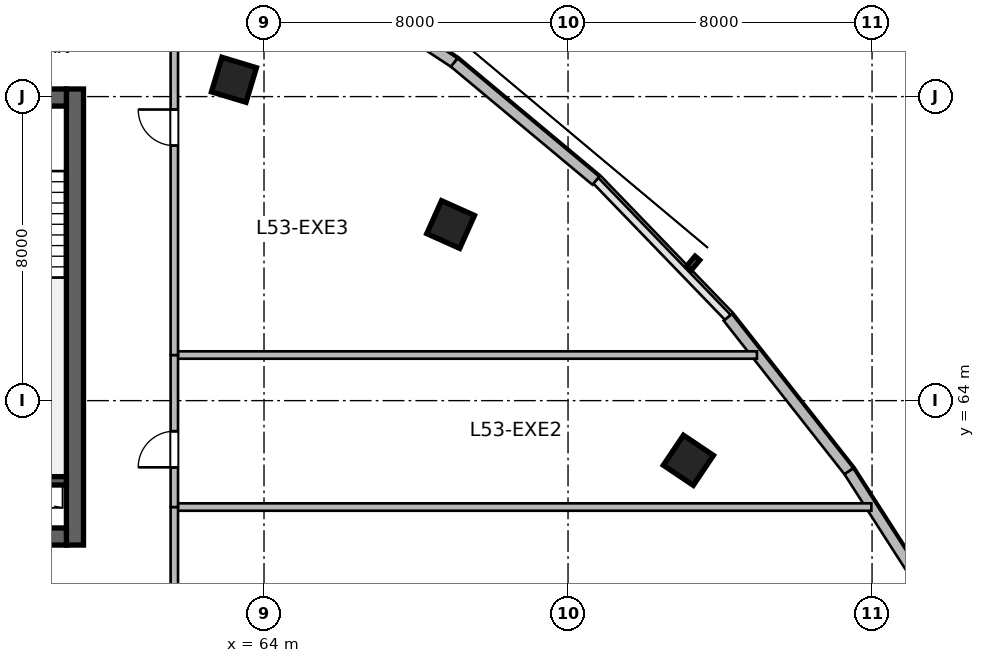
"""IFC4 building model, lengths in metres.
Left out: names, types, materials, properties, quantities, classifications, styles, units other than length and angle.
Written with IfcOpenShell. Run it as: python <this file> out.ifc"""

import sys

from ifc_helpers import new_model, si_unit, direction, frame, frame_2d, origin, origin_2d, place, context, subcontext, project, spatial, rectangle, extrude, source, transform, mapped, element, fill, save


model = new_model("IFC4")
c1 = context("Model", 3, precision=1e-05, world=origin(), true_north=direction((0.0, 1.0)))
c2 = subcontext(c1, "Body", "Model", "MODEL_VIEW")
j1 = project(units=[si_unit("LENGTHUNIT", "METRE"), si_unit("PLANEANGLEUNIT", "RADIAN")], contexts=[c1])
p1 = place(None, origin())
s1 = spatial("IfcSite", under=j1, at=p1, CompositionType="ELEMENT")
p2 = place(p1, origin())
s2 = spatial("IfcBuilding", under=s1, at=p2, CompositionType="ELEMENT")
p3 = place(p2, frame((0.0, 0.0, 219.6)))
s3 = spatial("IfcBuildingStorey", under=s2, at=p3, CompositionType="ELEMENT", Elevation=219.6)
m1 = source(origin(), c2, "Body", "SweptSolid", [
    extrude(rectangle(XDim=12.0, YDim=0.45, at=frame_2d((6.0, 0.0))), origin(), (0.0, 0.0, 1.0), 3.9),
])
p4 = place(p3, frame((59.025, 60.2, 0.0), z_axis=(0.0, 0.0, 1.0), x_axis=(0.0, 1.0, 0.0)))
e1 = element("IfcWall", 1, at=p4, inside=s3, PredefinedType="SHEAR", context=c2, shape_type="MappedRepresentation", body=[
    mapped(m1, transform((0.0, 0.0, 0.0), scale=1.0)),
])
m2 = source(origin(), c2, "Body", "SweptSolid", [
    extrude(rectangle(XDim=21.6, YDim=0.45, at=frame_2d((10.8, 0.0))), origin(), (0.0, 0.0, 1.0), 3.9),
])
p5 = place(p3, frame((37.2, 60.425, 0.0), z_axis=(0.0, 0.0, 1.0), x_axis=(1.0, 0.0, 0.0)))
e2 = element("IfcWall", 2, at=p5, inside=s3, PredefinedType="SHEAR", context=c2, shape_type="MappedRepresentation", body=[
    mapped(m2, transform((0.0, 0.0, 0.0), scale=1.0)),
])
p6 = place(p5, frame((1.1, 0.0, 0.0)))
e3 = element("IfcOpeningElement", 3, at=p6, cuts=e2, PredefinedType="OPENING", context=c2, shape_type="SweptSolid", body=[
    extrude(rectangle(XDim=1.15, YDim=2.15, at=frame_2d((0.575, 1.075))), frame((0.0, 0.235, 0.0), z_axis=(0.0, -1.0, 0.0), x_axis=(1.0, 0.0, 0.0)), (0.0, 0.0, 1.0), 0.47),
])
p7 = place(p5, frame((19.5, 0.0, 0.0)))
e4 = element("IfcOpeningElement", 4, at=p7, cuts=e2, PredefinedType="OPENING", context=c2, shape_type="SweptSolid", body=[
    extrude(rectangle(XDim=0.9, YDim=2.1, at=frame_2d((0.45, 1.05))), frame((0.0, 0.235, 0.0), z_axis=(0.0, -1.0, 0.0), x_axis=(1.0, 0.0, 0.0)), (0.0, 0.0, 1.0), 0.47),
])
p8 = place(p5, frame((12.02, 0.0, 0.0)))
e5 = element("IfcOpeningElement", 5, at=p8, cuts=e2, PredefinedType="OPENING", context=c2, shape_type="SweptSolid", body=[
    extrude(rectangle(XDim=1.6, YDim=2.15, at=frame_2d((0.8, 1.075))), frame((0.0, 0.235, 0.0), z_axis=(0.0, -1.0, 0.0), x_axis=(1.0, 0.0, 0.0)), (0.0, 0.0, 1.0), 0.47),
])
p9 = place(p3, frame((37.2, 71.975, 0.0), z_axis=(0.0, 0.0, 1.0), x_axis=(1.0, 0.0, 0.0)))
e6 = element("IfcWall", 6, at=p9, inside=s3, PredefinedType="SHEAR", context=c2, shape_type="MappedRepresentation", body=[
    mapped(m2, transform((0.0, 0.0, 0.0), scale=1.0)),
])
p10 = place(p9, frame((1.2, 0.0, 0.0)))
e7 = element("IfcOpeningElement", 7, at=p10, cuts=e6, PredefinedType="OPENING", context=c2, shape_type="SweptSolid", body=[
    extrude(rectangle(XDim=0.9, YDim=2.1, at=frame_2d((0.45, 1.05))), frame((0.0, 0.235, 0.0), z_axis=(0.0, -1.0, 0.0), x_axis=(1.0, 0.0, 0.0)), (0.0, 0.0, 1.0), 0.47),
])
p11 = place(p9, frame((14.7, 0.0, 0.0)))
e8 = element("IfcOpeningElement", 8, at=p11, cuts=e6, PredefinedType="OPENING", context=c2, shape_type="SweptSolid", body=[
    extrude(rectangle(XDim=1.2, YDim=2.15, at=frame_2d((0.6, 1.075))), frame((0.0, 0.235, 0.0), z_axis=(0.0, -1.0, 0.0), x_axis=(1.0, 0.0, 0.0)), (0.0, 0.0, 1.0), 0.47),
])
p12 = place(p9, frame((4.15, 0.0, 0.0)))
e9 = element("IfcOpeningElement", 9, at=p12, cuts=e6, PredefinedType="OPENING", context=c2, shape_type="SweptSolid", body=[
    extrude(rectangle(XDim=1.3, YDim=2.15, at=frame_2d((0.65, 1.075))), frame((0.0, 0.235, 0.0), z_axis=(0.0, -1.0, 0.0), x_axis=(1.0, 0.0, 0.0)), (0.0, 0.0, 1.0), 0.47),
])
p13 = place(p9, frame((7.25, 0.0, 0.0)))
e10 = element("IfcOpeningElement", 10, at=p13, cuts=e6, PredefinedType="OPENING", context=c2, shape_type="SweptSolid", body=[
    extrude(rectangle(XDim=0.9, YDim=2.1, at=frame_2d((0.45, 1.05))), frame((0.0, 0.235, 0.0), z_axis=(0.0, -1.0, 0.0), x_axis=(1.0, 0.0, 0.0)), (0.0, 0.0, 1.0), 0.47),
])
m3 = source(origin(), c2, "Body", "SweptSolid", [
    extrude(rectangle(XDim=3.27, YDim=0.22, at=frame_2d((1.635, 0.0))), origin(), (0.0, 0.0, 1.0), 3.9),
])
p14 = place(p3, frame((55.53, 61.89, 0.0), z_axis=(0.0, 0.0, 1.0), x_axis=(1.0, 0.0, 0.0)))
e11 = element("IfcWall", 11, at=p14, inside=s3, PredefinedType="SHEAR", context=c2, shape_type="MappedRepresentation", body=[
    mapped(m3, transform((0.0, 0.0, 0.0), scale=1.0)),
])
m4 = source(origin(), c2, "Body", "SweptSolid", [
    extrude(rectangle(XDim=0.95, YDim=0.95, at=origin_2d()), origin(), (0.0, 0.0, 1.0), 3.9),
])
for number, where, z_axis, x_axis in (
    (12, (63.209, 72.442, 0.0), (0.0, 0.0, 1.0), (0.289, 0.957, 0.0)),
    (13, (68.91, 68.633, 0.0), (0.0, 0.0, 1.0), (0.409, 0.912, 0.0)),
    (14, (75.167, 62.43, 0.0), (0.0, 0.0, 1.0), (0.558, 0.83, 0.0)),
):
    element("IfcColumn", number, at=place(p3, frame(where, z_axis=z_axis, x_axis=x_axis)), inside=s3, PredefinedType="COLUMN", context=c2, shape_type="MappedRepresentation", body=[
        mapped(m4, transform((0.0, 0.0, 0.0), scale=1.0)),
    ])
m5 = source(origin(), c2, "Body", "SweptSolid", [
    extrude(rectangle(XDim=4.713, YDim=0.28, at=frame_2d((2.356, 0.0))), origin(), (0.0, 0.0, 1.0), 3.64),
])
p15 = place(p3, frame((65.066, 75.482, 0.0), z_axis=(0.0, 0.0, 1.0), x_axis=(0.835974386457, -0.548768462275, 0.0)))
e15 = element("IfcWall", 15, at=p15, inside=s3, PredefinedType="SOLIDWALL", context=c2, shape_type="MappedRepresentation", body=[
    mapped(m5, transform((0.0, 0.0, 0.0), scale=1.0)),
])
m6 = source(origin(), c2, "Body", "SweptSolid", [
    extrude(rectangle(XDim=4.852, YDim=0.28, at=frame_2d((2.426, 0.0))), origin(), (0.0, 0.0, 1.0), 3.64),
])
p16 = place(p3, frame((69.006, 72.896, 0.0), z_axis=(0.0, 0.0, 1.0), x_axis=(0.767936605821, -0.640525853843, 0.0)))
e16 = element("IfcWall", 16, at=p16, inside=s3, PredefinedType="SOLIDWALL", context=c2, shape_type="MappedRepresentation", body=[
    mapped(m6, transform((0.0, 0.0, 0.0), scale=1.0)),
])
m7 = source(origin(), c2, "Body", "SweptSolid", [
    extrude(rectangle(XDim=5.153, YDim=0.28, at=frame_2d((2.577, 0.0))), origin(), (0.0, 0.0, 1.0), 3.64),
])
p17 = place(p3, frame((76.205, 66.19, 0.0), z_axis=(0.0, 0.0, 1.0), x_axis=(0.618179283891, -0.786037132054, 0.0)))
e17 = element("IfcWall", 17, at=p17, inside=s3, PredefinedType="SOLIDWALL", context=c2, shape_type="MappedRepresentation", body=[
    mapped(m7, transform((0.0, 0.0, 0.0), scale=1.0)),
])
m8 = source(origin(), c2, "Body", "SweptSolid", [
    extrude(rectangle(XDim=5.303, YDim=0.28, at=frame_2d((2.651, 0.0))), origin(), (0.0, 0.0, 1.0), 3.64),
])
p18 = place(p3, frame((79.391, 62.14, 0.0), z_axis=(0.0, 0.0, 1.0), x_axis=(0.540178067041, -0.84155074469, 0.0)))
e18 = element("IfcWall", 18, at=p18, inside=s3, PredefinedType="SOLIDWALL", context=c2, shape_type="MappedRepresentation", body=[
    mapped(m8, transform((0.0, 0.0, 0.0), scale=1.0)),
])
m9 = source(origin(), c2, "Body", "SweptSolid", [
    extrude(rectangle(XDim=18.342, YDim=0.195, at=frame_2d((9.171, 0.0))), origin(), (0.0, 0.0, 1.0), 3.64),
])
p19 = place(p3, frame((61.64, 61.2, 0.0), z_axis=(0.0, 0.0, 1.0), x_axis=(1.0, 0.0, 0.0)))
e19 = element("IfcWall", 19, at=p19, inside=s3, PredefinedType="PARTITIONING", context=c2, shape_type="MappedRepresentation", body=[
    mapped(m9, transform((0.0, 0.0, 0.0), scale=1.0)),
])
m10 = source(origin(), c2, "Body", "SweptSolid", [
    extrude(rectangle(XDim=3.24, YDim=0.195, at=frame_2d((1.62, 0.0))), origin(), (0.0, 0.0, 1.0), 3.64),
])
p20 = place(p3, frame((61.64, 57.96, 0.0), z_axis=(0.0, 0.0, 1.0), x_axis=(0.0, 1.0, 0.0)))
e20 = element("IfcWall", 20, at=p20, inside=s3, PredefinedType="PARTITIONING", context=c2, shape_type="MappedRepresentation", body=[
    mapped(m10, transform((0.0, 0.0, 0.0), scale=1.0)),
])
m11 = source(origin(), c2, "Body", "SweptSolid", [
    extrude(rectangle(XDim=15.332, YDim=0.195, at=frame_2d((7.666, 0.0))), origin(), (0.0, 0.0, 1.0), 3.64),
])
p21 = place(p3, frame((61.64, 65.2, 0.0), z_axis=(0.0, 0.0, 1.0), x_axis=(1.0, 0.0, 0.0)))
e21 = element("IfcWall", 21, at=p21, inside=s3, PredefinedType="PARTITIONING", context=c2, shape_type="MappedRepresentation", body=[
    mapped(m11, transform((0.0, 0.0, 0.0), scale=1.0)),
])
m12 = source(origin(), c2, "Body", "SweptSolid", [
    extrude(rectangle(XDim=4.0, YDim=0.195, at=frame_2d((2.0, 0.0))), origin(), (0.0, 0.0, 1.0), 3.64),
])
p22 = place(p3, frame((61.64, 61.2, 0.0), z_axis=(0.0, 0.0, 1.0), x_axis=(0.0, 1.0, 0.0)))
e22 = element("IfcWall", 22, at=p22, inside=s3, PredefinedType="PARTITIONING", context=c2, shape_type="MappedRepresentation", body=[
    mapped(m12, transform((0.0, 0.0, 0.0), scale=1.0)),
])
p23 = place(p22, frame((1.045, 0.0, 0.0)))
e23 = element("IfcOpeningElement", 23, at=p23, cuts=e22, PredefinedType="OPENING", context=c2, shape_type="SweptSolid", body=[
    extrude(rectangle(XDim=0.95, YDim=2.1, at=frame_2d((0.475, 1.05))), frame((0.0, 0.107, 0.0), z_axis=(0.0, -1.0, 0.0), x_axis=(1.0, 0.0, 0.0)), (0.0, 0.0, 1.0), 0.215),
])
m13 = source(origin(), c2, "Body", "SweptSolid", [
    extrude(rectangle(XDim=11.969, YDim=0.195, at=frame_2d((5.984, 0.0))), origin(), (0.0, 0.0, 1.0), 3.64),
])
p24 = place(p3, frame((61.64, 65.2, 0.0), z_axis=(0.0, 0.0, 1.0), x_axis=(0.0, 1.0, 0.0)))
e24 = element("IfcWall", 24, at=p24, inside=s3, PredefinedType="PARTITIONING", context=c2, shape_type="MappedRepresentation", body=[
    mapped(m13, transform((0.0, 0.0, 0.0), scale=1.0)),
])
p25 = place(p24, frame((5.51, 0.0, 0.0)))
e25 = element("IfcOpeningElement", 25, at=p25, cuts=e24, PredefinedType="OPENING", context=c2, shape_type="SweptSolid", body=[
    extrude(rectangle(XDim=0.95, YDim=2.1, at=frame_2d((0.475, 1.05))), frame((0.0, 0.107, 0.0), z_axis=(0.0, -1.0, 0.0), x_axis=(1.0, 0.0, 0.0)), (0.0, 0.0, 1.0), 0.215),
])
m14 = source(origin(), c2, "Body", "SweptSolid", [
    extrude(rectangle(XDim=0.95, YDim=2.1, at=frame_2d((0.475, 1.05))), frame((0.0, 0.025, 0.0), z_axis=(0.0, -1.0, 0.0), x_axis=(1.0, 0.0, 0.0)), (0.0, 0.0, 1.0), 0.05),
])
p26 = place(p23, origin())
e26 = element("IfcDoor", 26, at=p26, inside=s3, OperationType="SINGLE_SWING_LEFT", PredefinedType="DOOR", context=c2, shape_type="MappedRepresentation", body=[
    mapped(m14, transform((0.0, 0.0, 0.0), scale=1.0)),
])
fill(e23, e26)
p27 = place(p25, origin())
e27 = element("IfcDoor", 27, at=p27, inside=s3, OperationType="SINGLE_SWING_RIGHT", PredefinedType="DOOR", context=c2, shape_type="MappedRepresentation", body=[
    mapped(m14, transform((0.0, 0.0, 0.0), scale=1.0)),
])
fill(e25, e27)
save(model, sys.argv[1])
